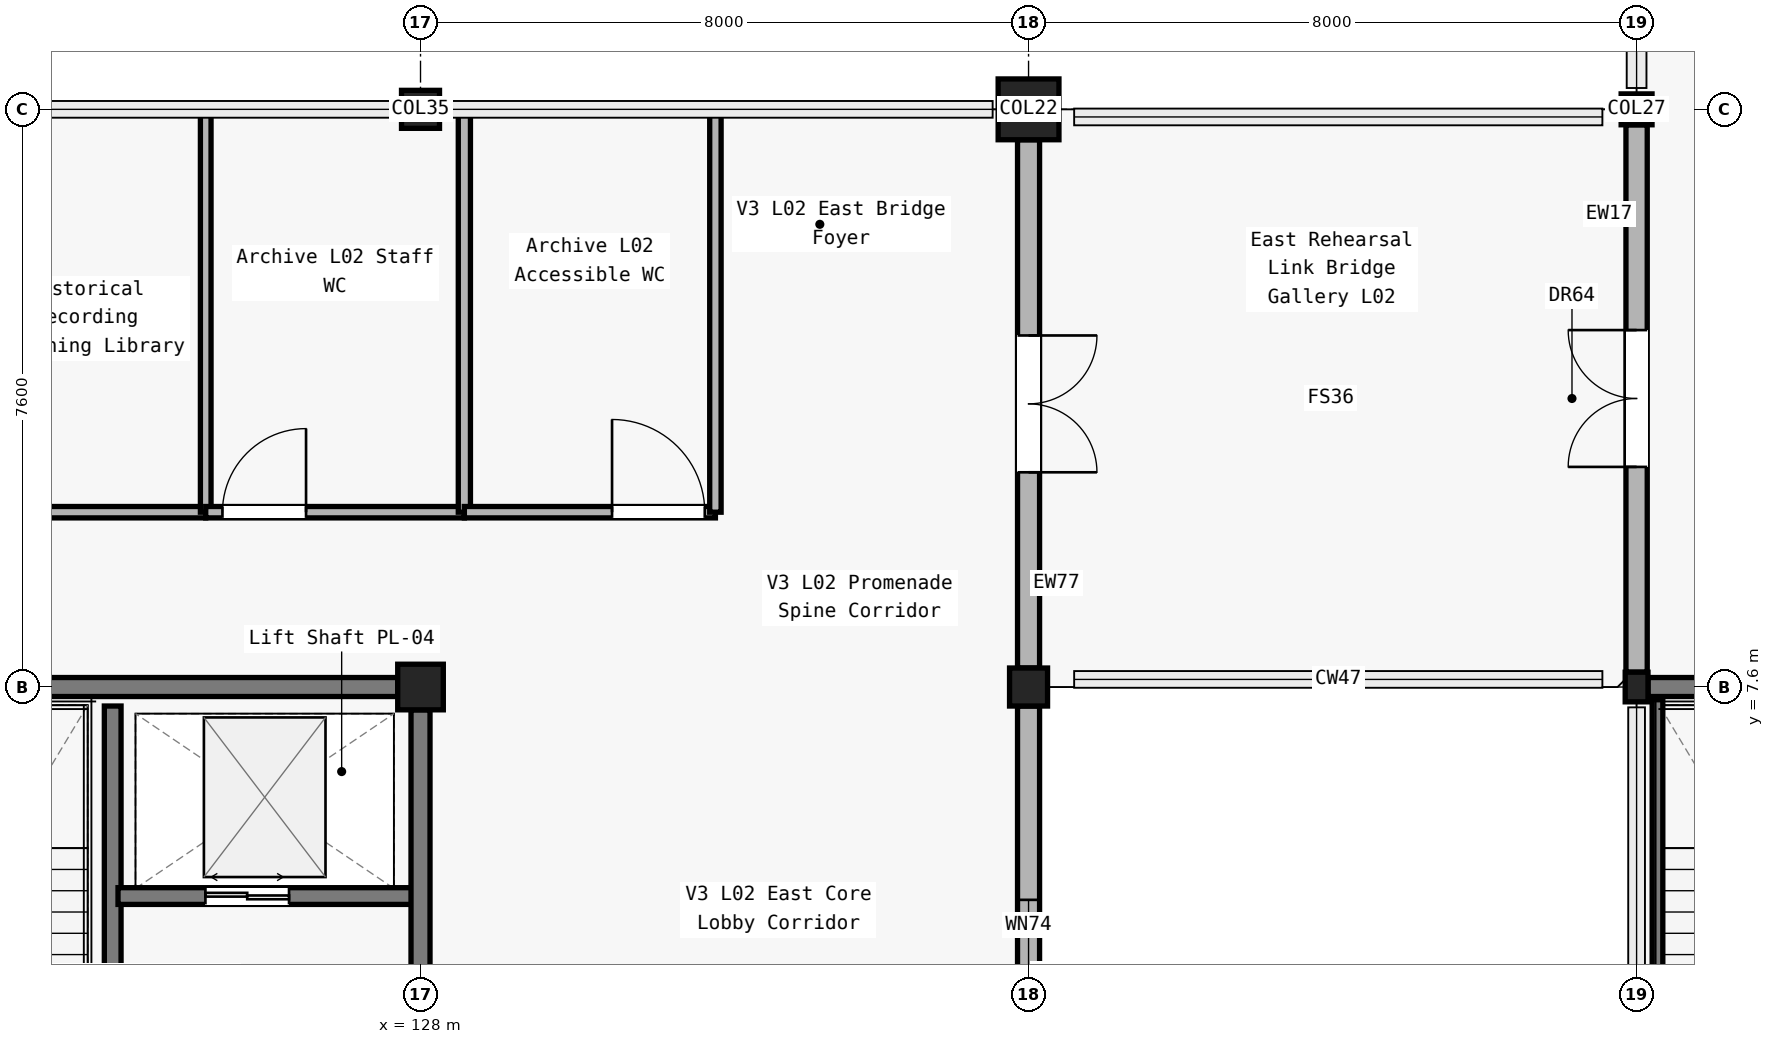
"""IFC4 building model, lengths in metres.
Left out: names, types, materials, properties, quantities, classifications, styles, units other than length and angle.
Written with IfcOpenShell. Run it as: python <this file> out.ifc"""

import sys

from ifc_helpers import new_model, si_unit, direction, frame, frame_2d, origin, origin_2d, place, context, subcontext, project, spatial, rectangle, circle, hollow_circle, i_section, extrude, element, fill, save


model = new_model("IFC4")
c1 = context("Model", 3, precision=1e-05, world=origin(), true_north=direction((0.0, 1.0)))
c2 = subcontext(c1, "Body", "Model", "MODEL_VIEW")
j1 = project(units=[si_unit("LENGTHUNIT", "METRE"), si_unit("PLANEANGLEUNIT", "RADIAN")], contexts=[c1])
p1 = place(None, origin())
s1 = spatial("IfcSite", under=j1, at=p1, CompositionType="ELEMENT")
p2 = place(p1, origin())
s2 = spatial("IfcBuilding", under=s1, at=p2, CompositionType="ELEMENT")
p3 = place(p2, frame((0.0, 0.0, 10.2)))
s3 = spatial("IfcBuildingStorey", under=s2, at=p3, CompositionType="ELEMENT", Elevation=10.2)
p4 = place(p3, frame((144.0, 7.6, 0.0), z_axis=(0.0, 0.0, 1.0), x_axis=(1.0, 0.0, 0.0)))
e1 = element("IfcColumn", 1, at=p4, inside=s3, PredefinedType="COLUMN", context=c2, shape_type="SweptSolid", body=[
    extrude(i_section(OverallWidth=0.3, OverallDepth=0.39, WebThickness=0.011, FlangeThickness=0.019, FilletRadius=0.027, at=origin_2d()), origin(), (0.0, 0.0, 1.0), 4.8),
])
p5 = place(p3, frame((144.0, 15.2, 0.0), z_axis=(0.0, 0.0, 1.0), x_axis=(1.0, 0.0, 0.0)))
e2 = element("IfcColumn", 2, at=p5, inside=s3, PredefinedType="COLUMN", context=c2, shape_type="SweptSolid", body=[
    extrude(hollow_circle(Radius=0.203, WallThickness=0.02, at=origin_2d()), origin(), (0.0, 0.0, 1.0), 4.8),
])
p6 = place(p3, frame((128.0, 7.6, 0.0), z_axis=(0.0, 0.0, 1.0), x_axis=(1.0, 0.0, 0.0)))
e3 = element("IfcColumn", 3, at=p6, inside=s3, PredefinedType="COLUMN", context=c2, shape_type="SweptSolid", body=[
    extrude(rectangle(XDim=0.6, YDim=0.6, at=origin_2d()), origin(), (0.0, 0.0, 1.0), 4.8),
])
for number, where, z_axis, x_axis in (
    (4, (128.0, 15.2, 0.0), (0.0, 0.0, 1.0), (1.0, 0.0, 0.0)),
    (5, (136.0, 7.6, 0.0), (0.0, 0.0, 1.0), (1.0, 0.0, 0.0)),
):
    element("IfcColumn", number, at=place(p3, frame(where, z_axis=z_axis, x_axis=x_axis)), inside=s3, PredefinedType="COLUMN", context=c2, shape_type="SweptSolid", body=[
        extrude(rectangle(XDim=0.5, YDim=0.5, at=origin_2d()), origin(), (0.0, 0.0, 1.0), 4.8),
    ])
p7 = place(p3, frame((136.0, 15.2, 0.0), z_axis=(0.0, 0.0, 1.0), x_axis=(1.0, 0.0, 0.0)))
e6 = element("IfcColumn", 6, at=p7, inside=s3, PredefinedType="COLUMN", context=c2, shape_type="SweptSolid", body=[
    extrude(circle(Radius=0.4, at=origin_2d()), origin(), (0.0, 0.0, 1.0), 4.8),
])
p8 = place(p3, frame((144.0, 7.795, 0.0), z_axis=(0.0, 0.0, 1.0), x_axis=(0.0, 1.0, 0.0)))
e7 = element("IfcWall", 7, at=p8, inside=s3, PredefinedType="SOLIDWALL", context=c2, shape_type="SweptSolid", body=[
    extrude(rectangle(XDim=7.202, YDim=0.28, at=frame_2d((3.601, 0.0))), origin(), (0.0, 0.0, 1.0), 3.86),
])
p9 = place(p8, frame((2.701, 0.0, 0.0)))
e8 = element("IfcOpeningElement", 8, at=p9, cuts=e7, PredefinedType="OPENING", context=c2, shape_type="SweptSolid", body=[
    extrude(rectangle(XDim=1.8, YDim=2.25, at=frame_2d((0.9, 1.125))), frame((0.0, 0.15, 0.0), z_axis=(0.0, -1.0, 0.0), x_axis=(1.0, 0.0, 0.0)), (0.0, 0.0, 1.0), 0.3),
])
p10 = place(p3, frame((136.0, 7.35, 0.0), z_axis=(0.0, 0.0, 1.0), x_axis=(0.0, -1.0, 0.0)))
e9 = element("IfcWall", 9, at=p10, inside=s3, PredefinedType="SOLIDWALL", context=c2, shape_type="SweptSolid", body=[
    extrude(rectangle(XDim=7.05, YDim=0.29, at=frame_2d((3.525, 0.0))), origin(), (0.0, 0.0, 1.0), 3.86),
])
p11 = place(p10, frame((2.55, 0.0, 0.95)))
e10 = element("IfcOpeningElement", 10, at=p11, cuts=e9, PredefinedType="OPENING", context=c2, shape_type="SweptSolid", body=[
    extrude(rectangle(XDim=1.95, YDim=1.5, at=frame_2d((0.975, 0.75))), frame((0.0, 0.155, 0.0), z_axis=(0.0, -1.0, 0.0), x_axis=(1.0, 0.0, 0.0)), (0.0, 0.0, 1.0), 0.31),
])
p12 = place(p3, frame((136.0, 14.8, 0.0), z_axis=(0.0, 0.0, 1.0), x_axis=(0.0, -1.0, 0.0)))
e11 = element("IfcWall", 11, at=p12, inside=s3, PredefinedType="SOLIDWALL", context=c2, shape_type="SweptSolid", body=[
    extrude(rectangle(XDim=6.95, YDim=0.29, at=frame_2d((3.475, 0.0))), origin(), (0.0, 0.0, 1.0), 3.86),
])
p13 = place(p12, frame((2.575, 0.0, 0.0)))
e12 = element("IfcOpeningElement", 12, at=p13, cuts=e11, PredefinedType="OPENING", context=c2, shape_type="SweptSolid", body=[
    extrude(rectangle(XDim=1.8, YDim=2.25, at=frame_2d((0.9, 1.125))), frame((0.0, 0.155, 0.0), z_axis=(0.0, -1.0, 0.0), x_axis=(1.0, 0.0, 0.0)), (0.0, 0.0, 1.0), 0.31),
])
p14 = place(p3, frame((144.15, 7.6, 0.0), z_axis=(0.0, 0.0, 1.0), x_axis=(1.0, 0.0, 0.0)))
e13 = element("IfcWall", 13, at=p14, inside=s3, PredefinedType="SOLIDWALL", context=c2, shape_type="SweptSolid", body=[
    extrude(rectangle(XDim=7.6, YDim=0.25, at=frame_2d((3.8, 0.0))), origin(), (0.0, 0.0, 1.0), 3.655),
])
p15 = place(p3, frame((120.25, 7.6, 0.0), z_axis=(0.0, 0.0, 1.0), x_axis=(1.0, 0.0, 0.0)))
e14 = element("IfcWall", 14, at=p15, inside=s3, PredefinedType="SOLIDWALL", context=c2, shape_type="SweptSolid", body=[
    extrude(rectangle(XDim=7.45, YDim=0.25, at=frame_2d((3.725, 0.0))), origin(), (0.0, 0.0, 1.0), 2.71),
])
p16 = place(p3, frame((123.95, 0.25, 0.0), z_axis=(0.0, 0.0, 1.0), x_axis=(0.0, 1.0, 0.0)))
e15 = element("IfcWall", 15, at=p16, inside=s3, PredefinedType="SOLIDWALL", context=c2, shape_type="SweptSolid", body=[
    extrude(rectangle(XDim=7.1, YDim=0.22, at=frame_2d((3.55, 0.0))), origin(), (0.0, 0.0, 1.0), 4.52),
])
p17 = place(p16, frame((0.35, 0.0, 0.0)))
e16 = element("IfcOpeningElement", 16, at=p17, cuts=e15, PredefinedType="OPENING", context=c2, shape_type="SweptSolid", body=[
    extrude(rectangle(XDim=1.2, YDim=2.15, at=frame_2d((0.6, 1.075))), frame((0.0, 0.12, 0.0), z_axis=(0.0, -1.0, 0.0), x_axis=(1.0, 0.0, 0.0)), (0.0, 0.0, 1.0), 0.24),
])
p18 = place(p3, frame((124.02, 4.85, 0.0), z_axis=(0.0, 0.0, 1.0), x_axis=(1.0, 0.0, 0.0)))
e17 = element("IfcWall", 17, at=p18, inside=s3, PredefinedType="SOLIDWALL", context=c2, shape_type="SweptSolid", body=[
    extrude(rectangle(XDim=3.93, YDim=0.22, at=frame_2d((1.965, 0.0))), origin(), (0.0, 0.0, 1.0), 3.82),
])
p19 = place(p18, frame((1.15, 0.0, 0.0)))
e18 = element("IfcOpeningElement", 18, at=p19, cuts=e17, PredefinedType="OPENING", context=c2, shape_type="SweptSolid", body=[
    extrude(rectangle(XDim=1.1, YDim=2.2, at=frame_2d((0.55, 1.1))), frame((0.0, 0.12, 0.0), z_axis=(0.0, -1.0, 0.0), x_axis=(1.0, 0.0, 0.0)), (0.0, 0.0, 1.0), 0.24),
])
p20 = place(p3, frame((128.0, 0.375, 0.0), z_axis=(0.0, 0.0, 1.0), x_axis=(0.0, 1.0, 0.0)))
e19 = element("IfcWall", 19, at=p20, inside=s3, PredefinedType="SOLIDWALL", context=c2, shape_type="SweptSolid", body=[
    extrude(rectangle(XDim=6.925, YDim=0.25, at=frame_2d((3.462, 0.0))), origin(), (0.0, 0.0, 1.0), 2.71),
])
p21 = place(p20, frame((1.975, 0.0, 0.0)))
e20 = element("IfcOpeningElement", 20, at=p21, cuts=e19, PredefinedType="OPENING", context=c2, shape_type="SweptSolid", body=[
    extrude(rectangle(XDim=1.35, YDim=2.2, at=frame_2d((0.675, 1.1))), frame((0.0, 0.135, 0.0), z_axis=(0.0, -1.0, 0.0), x_axis=(1.0, 0.0, 0.0)), (0.0, 0.0, 1.0), 0.27),
])
p22 = place(p3, frame((109.159, 9.9, 0.0), z_axis=(0.0, 0.0, 1.0), x_axis=(1.0, 0.0, 0.0)))
e21 = element("IfcWall", 21, at=p22, inside=s3, PredefinedType="PARTITIONING", context=c2, shape_type="SweptSolid", body=[
    extrude(rectangle(XDim=16.015, YDim=0.15, at=frame_2d((8.008, 0.0))), origin(), (0.0, 0.0, 1.0), 3.82),
])
p23 = place(p22, frame((6.05, 0.0, 0.0)))
e22 = element("IfcOpeningElement", 22, at=p23, cuts=e21, PredefinedType="OPENING", context=c2, shape_type="SweptSolid", body=[
    extrude(rectangle(XDim=1.04, YDim=2.15, at=frame_2d((0.52, 1.075))), frame((0.0, 0.085, 0.0), z_axis=(0.0, -1.0, 0.0), x_axis=(1.0, 0.0, 0.0)), (0.0, 0.0, 1.0), 0.17),
])
p24 = place(p3, frame((125.174, 9.9, 0.0), z_axis=(0.0, 0.0, 1.0), x_axis=(0.0, 1.0, 0.0)))
e23 = element("IfcWall", 23, at=p24, inside=s3, PredefinedType="PARTITIONING", context=c2, shape_type="SweptSolid", body=[
    extrude(rectangle(XDim=5.22, YDim=0.14, at=frame_2d((2.61, 0.0))), origin(), (0.0, 0.0, 1.0), 3.89),
])
p25 = place(p3, frame((125.174, 9.9, 0.0), z_axis=(0.0, 0.0, 1.0), x_axis=(1.0, 0.0, 0.0)))
e24 = element("IfcWall", 24, at=p25, inside=s3, PredefinedType="PARTITIONING", context=c2, shape_type="SweptSolid", body=[
    extrude(rectangle(XDim=3.403, YDim=0.15, at=frame_2d((1.701, 0.0))), origin(), (0.0, 0.0, 1.0), 3.895),
])
p26 = place(p25, frame((0.22, 0.0, 0.0)))
e25 = element("IfcOpeningElement", 25, at=p26, cuts=e24, PredefinedType="OPENING", context=c2, shape_type="SweptSolid", body=[
    extrude(rectangle(XDim=1.1, YDim=2.15, at=frame_2d((0.55, 1.075))), frame((0.0, 0.085, 0.0), z_axis=(0.0, -1.0, 0.0), x_axis=(1.0, 0.0, 0.0)), (0.0, 0.0, 1.0), 0.17),
])
p27 = place(p3, frame((128.577, 9.9, 0.0), z_axis=(0.0, 0.0, 1.0), x_axis=(0.0, 1.0, 0.0)))
e26 = element("IfcWall", 26, at=p27, inside=s3, PredefinedType="PARTITIONING", context=c2, shape_type="SweptSolid", body=[
    extrude(rectangle(XDim=5.22, YDim=0.16, at=frame_2d((2.61, 0.0))), origin(), (0.0, 0.0, 1.0), 2.71),
])
p28 = place(p3, frame((128.577, 9.9, 0.0), z_axis=(0.0, 0.0, 1.0), x_axis=(1.0, 0.0, 0.0)))
e27 = element("IfcWall", 27, at=p28, inside=s3, PredefinedType="PARTITIONING", context=c2, shape_type="SweptSolid", body=[
    extrude(rectangle(XDim=3.303, YDim=0.15, at=frame_2d((1.651, 0.0))), origin(), (0.0, 0.0, 1.0), 3.955),
])
p29 = place(p28, frame((1.943, 0.0, 0.0)))
e28 = element("IfcOpeningElement", 28, at=p29, cuts=e27, PredefinedType="OPENING", context=c2, shape_type="SweptSolid", body=[
    extrude(rectangle(XDim=1.22, YDim=2.15, at=frame_2d((0.61, 1.075))), frame((0.0, 0.085, 0.0), z_axis=(0.0, -1.0, 0.0), x_axis=(1.0, 0.0, 0.0)), (0.0, 0.0, 1.0), 0.17),
])
p30 = place(p3, frame((131.88, 9.9, 0.0), z_axis=(0.0, 0.0, 1.0), x_axis=(0.0, 1.0, 0.0)))
e29 = element("IfcWall", 29, at=p30, inside=s3, PredefinedType="PARTITIONING", context=c2, shape_type="SweptSolid", body=[
    extrude(rectangle(XDim=5.22, YDim=0.15, at=frame_2d((2.61, 0.0))), origin(), (0.0, 0.0, 1.0), 2.71),
])
p31 = place(p3, frame((144.275, 0.15, 0.0), z_axis=(0.0, 0.0, 1.0), x_axis=(0.0, 1.0, 0.0)))
e30 = element("IfcWall", 30, at=p31, inside=s3, PredefinedType="SOLIDWALL", context=c2, shape_type="SweptSolid", body=[
    extrude(rectangle(XDim=7.3, YDim=0.14, at=frame_2d((3.65, 0.0))), origin(), (0.0, 0.0, 1.0), 4.52),
])
p32 = place(p9, origin())
e31 = element("IfcDoor", 31, at=p32, inside=s3, OperationType="DOUBLE_DOOR_SINGLE_SWING", PredefinedType="DOOR", context=c2, shape_type="SweptSolid", body=[
    extrude(rectangle(XDim=1.8, YDim=2.25, at=frame_2d((0.9, 1.125))), frame((0.0, 0.025, 0.0), z_axis=(0.0, -1.0, 0.0), x_axis=(1.0, 0.0, 0.0)), (0.0, 0.0, 1.0), 0.05),
])
fill(e8, e31)
p33 = place(p11, origin())
e32 = element("IfcWindow", 32, at=p33, inside=s3, PartitioningType="DOUBLE_PANEL_VERTICAL", PredefinedType="WINDOW", context=c2, shape_type="SweptSolid", body=[
    extrude(rectangle(XDim=1.95, YDim=1.5, at=frame_2d((0.975, 0.75))), frame((0.0, 0.03, 0.0), z_axis=(0.0, -1.0, 0.0), x_axis=(1.0, 0.0, 0.0)), (0.0, 0.0, 1.0), 0.06),
])
fill(e10, e32)
p34 = place(p13, origin())
e33 = element("IfcDoor", 33, at=p34, inside=s3, OperationType="DOUBLE_DOOR_SINGLE_SWING", PredefinedType="DOOR", context=c2, shape_type="SweptSolid", body=[
    extrude(rectangle(XDim=1.8, YDim=2.25, at=frame_2d((0.9, 1.125))), frame((0.0, 0.025, 0.0), z_axis=(0.0, -1.0, 0.0), x_axis=(1.0, 0.0, 0.0)), (0.0, 0.0, 1.0), 0.05),
])
fill(e12, e33)
p35 = place(p19, origin())
e34 = element("IfcDoor", 34, at=p35, inside=s3, OperationType="DOUBLE_DOOR_SLIDING", PredefinedType="DOOR", context=c2, shape_type="SweptSolid", body=[
    extrude(rectangle(XDim=1.1, YDim=2.2, at=frame_2d((0.55, 1.1))), frame((0.0, 0.025, 0.0), z_axis=(0.0, -1.0, 0.0), x_axis=(1.0, 0.0, 0.0)), (0.0, 0.0, 1.0), 0.05),
])
fill(e18, e34)
p36 = place(p26, origin())
e35 = element("IfcDoor", 35, at=p36, inside=s3, OperationType="SINGLE_SWING_RIGHT", PredefinedType="DOOR", context=c2, shape_type="SweptSolid", body=[
    extrude(rectangle(XDim=1.1, YDim=2.15, at=frame_2d((0.55, 1.075))), frame((0.0, 0.025, 0.0), z_axis=(0.0, -1.0, 0.0), x_axis=(1.0, 0.0, 0.0)), (0.0, 0.0, 1.0), 0.05),
])
fill(e25, e35)
p37 = place(p29, origin())
e36 = element("IfcDoor", 36, at=p37, inside=s3, OperationType="SINGLE_SWING_LEFT", PredefinedType="DOOR", context=c2, shape_type="SweptSolid", body=[
    extrude(rectangle(XDim=1.22, YDim=2.15, at=frame_2d((0.61, 1.075))), frame((0.0, 0.025, 0.0), z_axis=(0.0, -1.0, 0.0), x_axis=(1.0, 0.0, 0.0)), (0.0, 0.0, 1.0), 0.05),
])
fill(e28, e36)
save(model, sys.argv[1])
